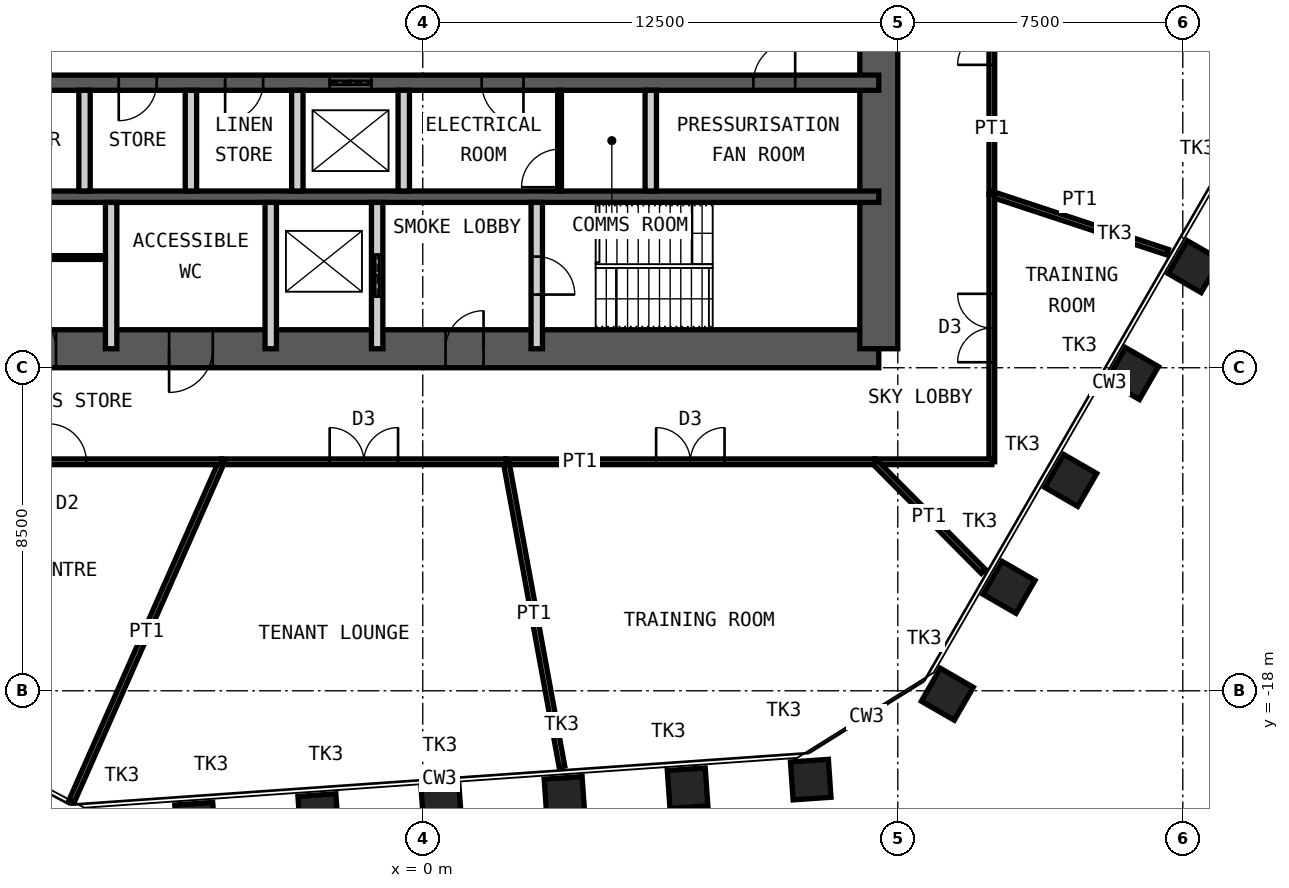
"""IFC4 building model, lengths in metres.
Left out: names, types, materials, properties, quantities, classifications, styles, units other than length and angle.
Written with IfcOpenShell. Run it as: python <this file> out.ifc"""

import sys

from ifc_helpers import new_model, si_unit, direction, frame, frame_2d, origin, origin_2d, place, context, subcontext, project, spatial, rectangle, hollow_rectangle, extrude, element, fill, save


model = new_model("IFC4")
c1 = context("Model", 3, precision=1e-05, world=origin(), true_north=direction((0.0, 1.0)))
c2 = subcontext(c1, "Body", "Model", "MODEL_VIEW")
j1 = project(units=[si_unit("LENGTHUNIT", "METRE"), si_unit("PLANEANGLEUNIT", "RADIAN")], contexts=[c1])
p1 = place(None, origin())
s1 = spatial("IfcSite", under=j1, at=p1, CompositionType="ELEMENT")
p2 = place(p1, origin())
s2 = spatial("IfcBuilding", under=s1, at=p2, CompositionType="ELEMENT")
p3 = place(p2, frame((0.0, 0.0, 262.0)))
s3 = spatial("IfcBuildingStorey", under=s2, at=p3, CompositionType="ELEMENT", Elevation=262.0)
for number, where, z_axis, x_axis in (
    (1, (20.3, -6.84, 0.0), (0.0, 0.0, 1.0), (0.5, 0.866, 0.0)),
    (2, (18.676, -9.653, 0.0), (0.0, 0.0, 1.0), (0.5, 0.866, 0.0)),
    (3, (17.052, -12.466, 0.0), (0.0, 0.0, 1.0), (0.5, 0.866, 0.0)),
    (4, (15.427, -15.279, 0.0), (0.0, 0.0, 1.0), (0.5, 0.866, 0.0)),
    (5, (13.803, -18.092, 0.0), (0.0, 0.0, 1.0), (0.5, 0.866, 0.0)),
    (6, (10.209, -20.337, 0.0), (0.0, 0.0, 1.0), (0.998, 0.07, 0.0)),
    (7, (6.969, -20.564, 0.0), (0.0, 0.0, 1.0), (0.998, 0.07, 0.0)),
    (8, (3.729, -20.791, 0.0), (0.0, 0.0, 1.0), (0.998, 0.07, 0.0)),
    (9, (0.489, -21.017, 0.0), (0.0, 0.0, 1.0), (0.998, 0.07, 0.0)),
    (10, (-2.751, -21.244, 0.0), (0.0, 0.0, 1.0), (0.998, 0.07, 0.0)),
    (11, (-5.991, -21.47, 0.0), (0.0, 0.0, 1.0), (0.998, 0.07, 0.0)),
):
    element("IfcColumn", number, at=place(p3, frame(where, z_axis=z_axis, x_axis=x_axis)), inside=s3, PredefinedType="COLUMN", context=c2, shape_type="SweptSolid", body=[
        extrude(hollow_rectangle(XDim=1.0, YDim=1.0, WallThickness=0.08, at=origin_2d()), origin(), (0.0, 0.0, 1.0), 4.2),
    ])
p4 = place(p3, frame((-12.0, -9.0, 0.0), z_axis=(0.0, 0.0, 1.0), x_axis=(1.0, 0.0, 0.0)))
e12 = element("IfcWall", 12, at=p4, inside=s3, PredefinedType="SHEAR", context=c2, shape_type="SweptSolid", body=[
    extrude(rectangle(XDim=24.0, YDim=1.0, at=frame_2d((12.0, 0.0))), origin(), (0.0, 0.0, 1.0), 4.2),
])
p5 = place(p4, frame((1.35, 0.0, 0.0)))
e13 = element("IfcOpeningElement", 13, at=p5, cuts=e12, PredefinedType="OPENING", context=c2, shape_type="SweptSolid", body=[
    extrude(rectangle(XDim=1.0, YDim=2.1, at=frame_2d((0.5, 1.05))), frame((0.0, 0.51, 0.0), z_axis=(0.0, -1.0, 0.0), x_axis=(1.0, 0.0, 0.0)), (0.0, 0.0, 1.0), 1.02),
])
p6 = place(p4, frame((5.325, 0.0, 0.0)))
e14 = element("IfcOpeningElement", 14, at=p6, cuts=e12, PredefinedType="OPENING", context=c2, shape_type="SweptSolid", body=[
    extrude(rectangle(XDim=1.15, YDim=2.1, at=frame_2d((0.575, 1.05))), frame((0.0, 0.51, 0.0), z_axis=(0.0, -1.0, 0.0), x_axis=(1.0, 0.0, 0.0)), (0.0, 0.0, 1.0), 1.02),
])
p7 = place(p4, frame((12.6, 0.0, 0.0)))
e15 = element("IfcOpeningElement", 15, at=p7, cuts=e12, PredefinedType="OPENING", context=c2, shape_type="SweptSolid", body=[
    extrude(rectangle(XDim=1.0, YDim=2.1, at=frame_2d((0.5, 1.05))), frame((0.0, 0.51, 0.0), z_axis=(0.0, -1.0, 0.0), x_axis=(1.0, 0.0, 0.0)), (0.0, 0.0, 1.0), 1.02),
])
p8 = place(p3, frame((12.0, -9.0, 0.0), z_axis=(0.0, 0.0, 1.0), x_axis=(0.0, 1.0, 0.0)))
e16 = element("IfcWall", 16, at=p8, inside=s3, PredefinedType="SHEAR", context=c2, shape_type="SweptSolid", body=[
    extrude(rectangle(XDim=18.0, YDim=1.0, at=frame_2d((9.0, 0.0))), origin(), (0.0, 0.0, 1.0), 4.2),
])
p9 = place(p8, frame((8.1, 0.0, 0.0)))
e17 = element("IfcOpeningElement", 17, at=p9, cuts=e16, PredefinedType="OPENING", context=c2, shape_type="SweptSolid", body=[
    extrude(rectangle(XDim=1.8, YDim=2.1, at=frame_2d((0.9, 1.05))), frame((0.0, 0.51, 0.0), z_axis=(0.0, -1.0, 0.0), x_axis=(1.0, 0.0, 0.0)), (0.0, 0.0, 1.0), 1.02),
])
p10 = place(p3, frame((-12.0, -2.0, 0.0), z_axis=(0.0, 0.0, 1.0), x_axis=(1.0, 0.0, 0.0)))
e18 = element("IfcWall", 18, at=p10, inside=s3, PredefinedType="SHEAR", context=c2, shape_type="SweptSolid", body=[
    extrude(rectangle(XDim=24.0, YDim=0.4, at=frame_2d((12.0, 0.0))), origin(), (0.0, 0.0, 1.0), 4.2),
])
p11 = place(p10, frame((1.1, 0.0, 0.0)))
e19 = element("IfcOpeningElement", 19, at=p11, cuts=e18, PredefinedType="OPENING", context=c2, shape_type="SweptSolid", body=[
    extrude(rectangle(XDim=1.1, YDim=2.1, at=frame_2d((0.55, 1.05))), frame((0.0, 0.21, 0.0), z_axis=(0.0, -1.0, 0.0), x_axis=(1.0, 0.0, 0.0)), (0.0, 0.0, 1.0), 0.42),
])
p12 = place(p10, frame((13.55, 0.0, 0.0)))
e20 = element("IfcOpeningElement", 20, at=p12, cuts=e18, PredefinedType="OPENING", context=c2, shape_type="SweptSolid", body=[
    extrude(rectangle(XDim=1.1, YDim=2.1, at=frame_2d((0.55, 1.05))), frame((0.0, 0.21, 0.0), z_axis=(0.0, -1.0, 0.0), x_axis=(1.0, 0.0, 0.0)), (0.0, 0.0, 1.0), 0.42),
])
p13 = place(p10, frame((20.7, 0.0, 0.0)))
e21 = element("IfcOpeningElement", 21, at=p13, cuts=e18, PredefinedType="OPENING", context=c2, shape_type="SweptSolid", body=[
    extrude(rectangle(XDim=1.1, YDim=2.1, at=frame_2d((0.55, 1.05))), frame((0.0, 0.21, 0.0), z_axis=(0.0, -1.0, 0.0), x_axis=(1.0, 0.0, 0.0)), (0.0, 0.0, 1.0), 0.42),
])
p14 = place(p10, frame((4.0, 0.0, 0.0)))
e22 = element("IfcOpeningElement", 22, at=p14, cuts=e18, PredefinedType="OPENING", context=c2, shape_type="SweptSolid", body=[
    extrude(rectangle(XDim=1.0, YDim=2.1, at=frame_2d((0.5, 1.05))), frame((0.0, 0.21, 0.0), z_axis=(0.0, -1.0, 0.0), x_axis=(1.0, 0.0, 0.0)), (0.0, 0.0, 1.0), 0.42),
])
p15 = place(p10, frame((6.8, 0.0, 0.0)))
e23 = element("IfcOpeningElement", 23, at=p15, cuts=e18, PredefinedType="OPENING", context=c2, shape_type="SweptSolid", body=[
    extrude(rectangle(XDim=1.0, YDim=2.1, at=frame_2d((0.5, 1.05))), frame((0.0, 0.21, 0.0), z_axis=(0.0, -1.0, 0.0), x_axis=(1.0, 0.0, 0.0)), (0.0, 0.0, 1.0), 0.42),
])
p16 = place(p10, frame((9.55, 0.0, 0.0)))
e24 = element("IfcOpeningElement", 24, at=p16, cuts=e18, PredefinedType="OPENING", context=c2, shape_type="SweptSolid", body=[
    extrude(rectangle(XDim=1.1, YDim=2.4, at=frame_2d((0.55, 1.2))), frame((0.0, 0.21, 0.0), z_axis=(0.0, -1.0, 0.0), x_axis=(1.0, 0.0, 0.0)), (0.0, 0.0, 1.0), 0.42),
])
p17 = place(p3, frame((-12.0, -5.0, 0.0), z_axis=(0.0, 0.0, 1.0), x_axis=(1.0, 0.0, 0.0)))
e25 = element("IfcWall", 25, at=p17, inside=s3, PredefinedType="SHEAR", context=c2, shape_type="SweptSolid", body=[
    extrude(rectangle(XDim=24.0, YDim=0.3, at=frame_2d((12.0, 0.0))), origin(), (0.0, 0.0, 1.0), 4.2),
])
for number, where, z_axis, x_axis in (
    (26, (-8.9, -4.85, 0.0), (0.0, 0.0, 1.0), (0.0, 1.0, 0.0)),
    (27, (-6.1, -4.85, 0.0), (0.0, 0.0, 1.0), (0.0, 1.0, 0.0)),
    (28, (-3.3, -4.85, 0.0), (0.0, 0.0, 1.0), (0.0, 1.0, 0.0)),
    (29, (-0.5, -4.85, 0.0), (0.0, 0.0, 1.0), (0.0, 1.0, 0.0)),
    (30, (6.0, -4.85, 0.0), (0.0, 0.0, 1.0), (0.0, 1.0, 0.0)),
):
    element("IfcWall", number, at=place(p3, frame(where, z_axis=z_axis, x_axis=x_axis)), inside=s3, PredefinedType="PARTITIONING", context=c2, shape_type="SweptSolid", body=[
        extrude(rectangle(XDim=2.65, YDim=0.3, at=frame_2d((1.325, 0.0))), origin(), (0.0, 0.0, 1.0), 3.98),
    ])
for number, where, z_axis, x_axis in (
    (31, (-8.2, -9.0, 0.0), (0.0, 0.0, 1.0), (0.0, 1.0, 0.0)),
    (32, (-4.0, -9.0, 0.0), (0.0, 0.0, 1.0), (0.0, 1.0, 0.0)),
):
    element("IfcWall", number, at=place(p3, frame(where, z_axis=z_axis, x_axis=x_axis)), inside=s3, PredefinedType="PARTITIONING", context=c2, shape_type="SweptSolid", body=[
        extrude(rectangle(XDim=3.85, YDim=0.3, at=frame_2d((1.925, 0.0))), origin(), (0.0, 0.0, 1.0), 3.98),
    ])
p18 = place(p3, frame((-1.2, -9.0, 0.0), z_axis=(0.0, 0.0, 1.0), x_axis=(0.0, 1.0, 0.0)))
e33 = element("IfcWall", 33, at=p18, inside=s3, PredefinedType="PARTITIONING", context=c2, shape_type="SweptSolid", body=[
    extrude(rectangle(XDim=3.85, YDim=0.3, at=frame_2d((1.925, 0.0))), origin(), (0.0, 0.0, 1.0), 3.98),
])
p19 = place(p18, frame((1.375, 0.0, 0.0)))
e34 = element("IfcOpeningElement", 34, at=p19, cuts=e33, PredefinedType="OPENING", context=c2, shape_type="SweptSolid", body=[
    extrude(rectangle(XDim=1.1, YDim=2.4, at=frame_2d((0.55, 1.2))), frame((0.0, 0.16, 0.0), z_axis=(0.0, -1.0, 0.0), x_axis=(1.0, 0.0, 0.0)), (0.0, 0.0, 1.0), 0.32),
])
p20 = place(p3, frame((3.0, -9.0, 0.0), z_axis=(0.0, 0.0, 1.0), x_axis=(0.0, 1.0, 0.0)))
e35 = element("IfcWall", 35, at=p20, inside=s3, PredefinedType="PARTITIONING", context=c2, shape_type="SweptSolid", body=[
    extrude(rectangle(XDim=3.85, YDim=0.3, at=frame_2d((1.925, 0.0))), origin(), (0.0, 0.0, 1.0), 3.98),
])
p21 = place(p20, frame((1.425, 0.0, 0.0)))
e36 = element("IfcOpeningElement", 36, at=p21, cuts=e35, PredefinedType="OPENING", context=c2, shape_type="SweptSolid", body=[
    extrude(rectangle(XDim=1.0, YDim=2.1, at=frame_2d((0.5, 1.05))), frame((0.0, 0.16, 0.0), z_axis=(0.0, -1.0, 0.0), x_axis=(1.0, 0.0, 0.0)), (0.0, 0.0, 1.0), 0.32),
])
p22 = place(p3, frame((3.6, -4.85, 0.0), z_axis=(0.0, 0.0, 1.0), x_axis=(0.0, 1.0, 0.0)))
e37 = element("IfcWall", 37, at=p22, inside=s3, PredefinedType="PARTITIONING", context=c2, shape_type="SweptSolid", body=[
    extrude(rectangle(XDim=2.65, YDim=0.1, at=frame_2d((1.325, 0.0))), origin(), (0.0, 0.0, 1.0), 3.98),
])
p23 = place(p22, frame((0.1, 0.0, 0.0)))
e38 = element("IfcOpeningElement", 38, at=p23, cuts=e37, PredefinedType="OPENING", context=c2, shape_type="SweptSolid", body=[
    extrude(rectangle(XDim=1.0, YDim=2.4, at=frame_2d((0.5, 1.2))), frame((0.0, 0.06, 0.0), z_axis=(0.0, -1.0, 0.0), x_axis=(1.0, 0.0, 0.0)), (0.0, 0.0, 1.0), 0.12),
])
p24 = place(p3, frame((-11.5, -6.6, 0.0), z_axis=(0.0, 0.0, 1.0), x_axis=(1.0, 0.0, 0.0)))
e39 = element("IfcWall", 39, at=p24, inside=s3, PredefinedType="PARTITIONING", context=c2, shape_type="SweptSolid", body=[
    extrude(rectangle(XDim=3.15, YDim=0.1, at=frame_2d((1.575, 0.0))), origin(), (0.0, 0.0, 1.0), 3.98),
])
p25 = place(p24, frame((0.1, 0.0, 0.0)))
e40 = element("IfcOpeningElement", 40, at=p25, cuts=e39, PredefinedType="OPENING", context=c2, shape_type="SweptSolid", body=[
    extrude(rectangle(XDim=1.0, YDim=2.4, at=frame_2d((0.5, 1.2))), frame((0.0, 0.06, 0.0), z_axis=(0.0, -1.0, 0.0), x_axis=(1.0, 0.0, 0.0)), (0.0, 0.0, 1.0), 0.12),
])
p26 = place(p3, frame((14.975, 3.675, 0.0), z_axis=(0.0, 0.0, 1.0), x_axis=(0.0, -1.0, 0.0)))
e41 = element("IfcWall", 41, at=p26, inside=s3, PredefinedType="PARTITIONING", context=c2, shape_type="SweptSolid", body=[
    extrude(rectangle(XDim=8.61, YDim=0.15, at=frame_2d((4.305, 0.0))), origin(), (0.0, 0.0, 1.0), 4.03),
])
p27 = place(p26, frame((3.405, 0.0, 0.0)))
e42 = element("IfcOpeningElement", 42, at=p27, cuts=e41, PredefinedType="OPENING", context=c2, shape_type="SweptSolid", body=[
    extrude(rectangle(XDim=1.8, YDim=2.4, at=frame_2d((0.9, 1.2))), frame((0.0, 0.085, 0.0), z_axis=(0.0, -1.0, 0.0), x_axis=(1.0, 0.0, 0.0)), (0.0, 0.0, 1.0), 0.17),
])
p28 = place(p3, frame((19.598, -6.459, 0.0), z_axis=(0.0, 0.0, 1.0), x_axis=(-0.949751112406, 0.313006109338, 0.0)))
e43 = element("IfcWall", 43, at=p28, inside=s3, PredefinedType="PARTITIONING", context=c2, shape_type="SweptSolid", body=[
    extrude(rectangle(XDim=4.868, YDim=0.15, at=frame_2d((2.434, 0.0))), origin(), (0.0, 0.0, 1.0), 2.93),
])
p29 = place(p3, frame((14.975, -4.935, 0.0), z_axis=(0.0, 0.0, 1.0), x_axis=(0.0, -1.0, 0.0)))
e44 = element("IfcWall", 44, at=p29, inside=s3, PredefinedType="PARTITIONING", context=c2, shape_type="SweptSolid", body=[
    extrude(rectangle(XDim=7.04, YDim=0.15, at=frame_2d((3.52, 0.0))), origin(), (0.0, 0.0, 1.0), 4.03),
])
p30 = place(p29, frame((2.62, 0.0, 0.0)))
e45 = element("IfcOpeningElement", 45, at=p30, cuts=e44, PredefinedType="OPENING", context=c2, shape_type="SweptSolid", body=[
    extrude(rectangle(XDim=1.8, YDim=2.4, at=frame_2d((0.9, 1.2))), frame((0.0, 0.085, 0.0), z_axis=(0.0, -1.0, 0.0), x_axis=(1.0, 0.0, 0.0)), (0.0, 0.0, 1.0), 0.17),
])
p31 = place(p3, frame((14.975, -11.975, 0.0), z_axis=(0.0, 0.0, 1.0), x_axis=(-1.0, 0.0, 0.0)))
e46 = element("IfcWall", 46, at=p31, inside=s3, PredefinedType="PARTITIONING", context=c2, shape_type="SweptSolid", body=[
    extrude(rectangle(XDim=3.086, YDim=0.15, at=frame_2d((1.543, 0.0))), origin(), (0.0, 0.0, 1.0), 4.03),
])
p32 = place(p3, frame((14.751, -14.858, 0.0), z_axis=(0.0, 0.0, 1.0), x_axis=(-0.704577983436, 0.709626567468, 0.0)))
e47 = element("IfcWall", 47, at=p32, inside=s3, PredefinedType="PARTITIONING", context=c2, shape_type="SweptSolid", body=[
    extrude(rectangle(XDim=4.062, YDim=0.15, at=frame_2d((2.031, 0.0))), origin(), (0.0, 0.0, 1.0), 2.93),
])
p33 = place(p3, frame((11.889, -11.975, 0.0), z_axis=(0.0, 0.0, 1.0), x_axis=(-1.0, 0.0, 0.0)))
e48 = element("IfcWall", 48, at=p33, inside=s3, PredefinedType="PARTITIONING", context=c2, shape_type="SweptSolid", body=[
    extrude(rectangle(XDim=9.695, YDim=0.15, at=frame_2d((4.848, 0.0))), origin(), (0.0, 0.0, 1.0), 4.03),
])
p34 = place(p33, frame((3.948, 0.0, 0.0)))
e49 = element("IfcOpeningElement", 49, at=p34, cuts=e48, PredefinedType="OPENING", context=c2, shape_type="SweptSolid", body=[
    extrude(rectangle(XDim=1.8, YDim=2.4, at=frame_2d((0.9, 1.2))), frame((0.0, 0.085, 0.0), z_axis=(0.0, -1.0, 0.0), x_axis=(1.0, 0.0, 0.0)), (0.0, 0.0, 1.0), 0.17),
])
p35 = place(p3, frame((3.662, -19.994, 0.0), z_axis=(0.0, 0.0, 1.0), x_axis=(-0.180166095058, 0.983636202156, 0.0)))
e50 = element("IfcWall", 50, at=p35, inside=s3, PredefinedType="PARTITIONING", context=c2, shape_type="SweptSolid", body=[
    extrude(rectangle(XDim=8.152, YDim=0.15, at=frame_2d((4.076, 0.0))), origin(), (0.0, 0.0, 1.0), 2.93),
])
p36 = place(p3, frame((2.194, -11.975, 0.0), z_axis=(0.0, 0.0, 1.0), x_axis=(-1.0, 0.0, 0.0)))
e51 = element("IfcWall", 51, at=p36, inside=s3, PredefinedType="PARTITIONING", context=c2, shape_type="SweptSolid", body=[
    extrude(rectangle(XDim=7.486, YDim=0.15, at=frame_2d((3.743, 0.0))), origin(), (0.0, 0.0, 1.0), 4.03),
])
p37 = place(p36, frame((2.843, 0.0, 0.0)))
e52 = element("IfcOpeningElement", 52, at=p37, cuts=e51, PredefinedType="OPENING", context=c2, shape_type="SweptSolid", body=[
    extrude(rectangle(XDim=1.8, YDim=2.4, at=frame_2d((0.9, 1.2))), frame((0.0, 0.085, 0.0), z_axis=(0.0, -1.0, 0.0), x_axis=(1.0, 0.0, 0.0)), (0.0, 0.0, 1.0), 0.17),
])
p38 = place(p3, frame((-9.24, -20.907, 0.0), z_axis=(0.0, 0.0, 1.0), x_axis=(0.404237785991, 0.91465393039, 0.0)))
e53 = element("IfcWall", 53, at=p38, inside=s3, PredefinedType="PARTITIONING", context=c2, shape_type="SweptSolid", body=[
    extrude(rectangle(XDim=9.765, YDim=0.15, at=frame_2d((4.883, 0.0))), origin(), (0.0, 0.0, 1.0), 3.03),
])
p39 = place(p3, frame((-5.292, -11.975, 0.0), z_axis=(0.0, 0.0, 1.0), x_axis=(-1.0, 0.0, 0.0)))
e54 = element("IfcWall", 54, at=p39, inside=s3, PredefinedType="PARTITIONING", context=c2, shape_type="SweptSolid", body=[
    extrude(rectangle(XDim=8.12, YDim=0.15, at=frame_2d((4.06, 0.0))), origin(), (0.0, 0.0, 1.0), 4.03),
])
p40 = place(p39, frame((3.56, 0.0, 0.0)))
e55 = element("IfcOpeningElement", 55, at=p40, cuts=e54, PredefinedType="OPENING", context=c2, shape_type="SweptSolid", body=[
    extrude(rectangle(XDim=1.0, YDim=2.4, at=frame_2d((0.5, 1.2))), frame((0.0, 0.085, 0.0), z_axis=(0.0, -1.0, 0.0), x_axis=(1.0, 0.0, 0.0)), (0.0, 0.0, 1.0), 0.17),
])
p41 = place(p5, origin())
e56 = element("IfcDoor", 56, at=p41, inside=s3, OperationType="SINGLE_SWING_RIGHT", PredefinedType="DOOR", context=c2, shape_type="SweptSolid", body=[
    extrude(rectangle(XDim=1.0, YDim=2.1, at=frame_2d((0.5, 1.05))), frame((0.0, 0.025, 0.0), z_axis=(0.0, -1.0, 0.0), x_axis=(1.0, 0.0, 0.0)), (0.0, 0.0, 1.0), 0.05),
])
fill(e13, e56)
p42 = place(p6, origin())
e57 = element("IfcDoor", 57, at=p42, inside=s3, OperationType="SINGLE_SWING_LEFT", PredefinedType="DOOR", context=c2, shape_type="SweptSolid", body=[
    extrude(rectangle(XDim=1.15, YDim=2.1, at=frame_2d((0.575, 1.05))), frame((0.0, 0.025, 0.0), z_axis=(0.0, -1.0, 0.0), x_axis=(1.0, 0.0, 0.0)), (0.0, 0.0, 1.0), 0.05),
])
fill(e14, e57)
p43 = place(p7, origin())
e58 = element("IfcDoor", 58, at=p43, inside=s3, OperationType="SINGLE_SWING_LEFT", PredefinedType="DOOR", context=c2, shape_type="SweptSolid", body=[
    extrude(rectangle(XDim=1.0, YDim=2.1, at=frame_2d((0.5, 1.05))), frame((0.0, 0.025, 0.0), z_axis=(0.0, -1.0, 0.0), x_axis=(1.0, 0.0, 0.0)), (0.0, 0.0, 1.0), 0.05),
])
fill(e15, e58)
p44 = place(p21, origin())
e59 = element("IfcDoor", 59, at=p44, inside=s3, OperationType="SINGLE_SWING_LEFT", PredefinedType="DOOR", context=c2, shape_type="SweptSolid", body=[
    extrude(rectangle(XDim=1.0, YDim=2.1, at=frame_2d((0.5, 1.05))), frame((0.0, 0.025, 0.0), z_axis=(0.0, -1.0, 0.0), x_axis=(1.0, 0.0, 0.0)), (0.0, 0.0, 1.0), 0.05),
])
fill(e36, e59)
p45 = place(p12, origin())
e60 = element("IfcDoor", 60, at=p45, inside=s3, OperationType="SINGLE_SWING_RIGHT", PredefinedType="DOOR", context=c2, shape_type="SweptSolid", body=[
    extrude(rectangle(XDim=1.1, YDim=2.1, at=frame_2d((0.55, 1.05))), frame((0.0, 0.025, 0.0), z_axis=(0.0, -1.0, 0.0), x_axis=(1.0, 0.0, 0.0)), (0.0, 0.0, 1.0), 0.05),
])
fill(e20, e60)
p46 = place(p13, origin())
e61 = element("IfcDoor", 61, at=p46, inside=s3, OperationType="SINGLE_SWING_LEFT", PredefinedType="DOOR", context=c2, shape_type="SweptSolid", body=[
    extrude(rectangle(XDim=1.1, YDim=2.1, at=frame_2d((0.55, 1.05))), frame((0.0, 0.025, 0.0), z_axis=(0.0, -1.0, 0.0), x_axis=(1.0, 0.0, 0.0)), (0.0, 0.0, 1.0), 0.05),
])
fill(e21, e61)
p47 = place(p19, origin())
e62 = element("IfcDoor", 62, at=p47, inside=s3, OperationType="DOUBLE_DOOR_SLIDING", PredefinedType="DOOR", context=c2, shape_type="SweptSolid", body=[
    extrude(rectangle(XDim=1.1, YDim=2.4, at=frame_2d((0.55, 1.2))), frame((0.0, 0.025, 0.0), z_axis=(0.0, -1.0, 0.0), x_axis=(1.0, 0.0, 0.0)), (0.0, 0.0, 1.0), 0.05),
])
fill(e34, e62)
p48 = place(p14, origin())
e63 = element("IfcDoor", 63, at=p48, inside=s3, OperationType="SINGLE_SWING_LEFT", PredefinedType="DOOR", context=c2, shape_type="SweptSolid", body=[
    extrude(rectangle(XDim=1.0, YDim=2.1, at=frame_2d((0.5, 1.05))), frame((0.0, 0.025, 0.0), z_axis=(0.0, -1.0, 0.0), x_axis=(1.0, 0.0, 0.0)), (0.0, 0.0, 1.0), 0.05),
])
fill(e22, e63)
p49 = place(p15, origin())
e64 = element("IfcDoor", 64, at=p49, inside=s3, OperationType="SINGLE_SWING_LEFT", PredefinedType="DOOR", context=c2, shape_type="SweptSolid", body=[
    extrude(rectangle(XDim=1.0, YDim=2.1, at=frame_2d((0.5, 1.05))), frame((0.0, 0.025, 0.0), z_axis=(0.0, -1.0, 0.0), x_axis=(1.0, 0.0, 0.0)), (0.0, 0.0, 1.0), 0.05),
])
fill(e23, e64)
p50 = place(p16, origin())
e65 = element("IfcDoor", 65, at=p50, inside=s3, OperationType="DOUBLE_DOOR_SLIDING", PredefinedType="DOOR", context=c2, shape_type="SweptSolid", body=[
    extrude(rectangle(XDim=1.1, YDim=2.4, at=frame_2d((0.55, 1.2))), frame((0.0, 0.025, 0.0), z_axis=(0.0, -1.0, 0.0), x_axis=(1.0, 0.0, 0.0)), (0.0, 0.0, 1.0), 0.05),
])
fill(e24, e65)
p51 = place(p23, origin())
e66 = element("IfcDoor", 66, at=p51, inside=s3, OperationType="SINGLE_SWING_RIGHT", PredefinedType="DOOR", context=c2, shape_type="SweptSolid", body=[
    extrude(rectangle(XDim=1.0, YDim=2.4, at=frame_2d((0.5, 1.2))), frame((0.0, 0.025, 0.0), z_axis=(0.0, -1.0, 0.0), x_axis=(1.0, 0.0, 0.0)), (0.0, 0.0, 1.0), 0.05),
])
fill(e38, e66)
p52 = place(p27, origin())
e67 = element("IfcDoor", 67, at=p52, inside=s3, OperationType="DOUBLE_DOOR_DOUBLE_SWING", PredefinedType="DOOR", context=c2, shape_type="SweptSolid", body=[
    extrude(rectangle(XDim=1.8, YDim=2.4, at=frame_2d((0.9, 1.2))), frame((0.0, 0.025, 0.0), z_axis=(0.0, -1.0, 0.0), x_axis=(1.0, 0.0, 0.0)), (0.0, 0.0, 1.0), 0.05),
])
fill(e42, e67)
p53 = place(p30, origin())
e68 = element("IfcDoor", 68, at=p53, inside=s3, OperationType="DOUBLE_DOOR_DOUBLE_SWING", PredefinedType="DOOR", context=c2, shape_type="SweptSolid", body=[
    extrude(rectangle(XDim=1.8, YDim=2.4, at=frame_2d((0.9, 1.2))), frame((0.0, 0.025, 0.0), z_axis=(0.0, -1.0, 0.0), x_axis=(1.0, 0.0, 0.0)), (0.0, 0.0, 1.0), 0.05),
])
fill(e45, e68)
p54 = place(p34, origin())
e69 = element("IfcDoor", 69, at=p54, inside=s3, OperationType="DOUBLE_DOOR_DOUBLE_SWING", PredefinedType="DOOR", context=c2, shape_type="SweptSolid", body=[
    extrude(rectangle(XDim=1.8, YDim=2.4, at=frame_2d((0.9, 1.2))), frame((0.0, 0.025, 0.0), z_axis=(0.0, -1.0, 0.0), x_axis=(1.0, 0.0, 0.0)), (0.0, 0.0, 1.0), 0.05),
])
fill(e49, e69)
p55 = place(p37, origin())
e70 = element("IfcDoor", 70, at=p55, inside=s3, OperationType="DOUBLE_DOOR_DOUBLE_SWING", PredefinedType="DOOR", context=c2, shape_type="SweptSolid", body=[
    extrude(rectangle(XDim=1.8, YDim=2.4, at=frame_2d((0.9, 1.2))), frame((0.0, 0.025, 0.0), z_axis=(0.0, -1.0, 0.0), x_axis=(1.0, 0.0, 0.0)), (0.0, 0.0, 1.0), 0.05),
])
fill(e52, e70)
p56 = place(p40, origin())
e71 = element("IfcDoor", 71, at=p56, inside=s3, OperationType="SINGLE_SWING_RIGHT", PredefinedType="DOOR", context=c2, shape_type="SweptSolid", body=[
    extrude(rectangle(XDim=1.0, YDim=2.4, at=frame_2d((0.5, 1.2))), frame((0.0, 0.025, 0.0), z_axis=(0.0, -1.0, 0.0), x_axis=(1.0, 0.0, 0.0)), (0.0, 0.0, 1.0), 0.05),
])
fill(e55, e71)
save(model, sys.argv[1])
